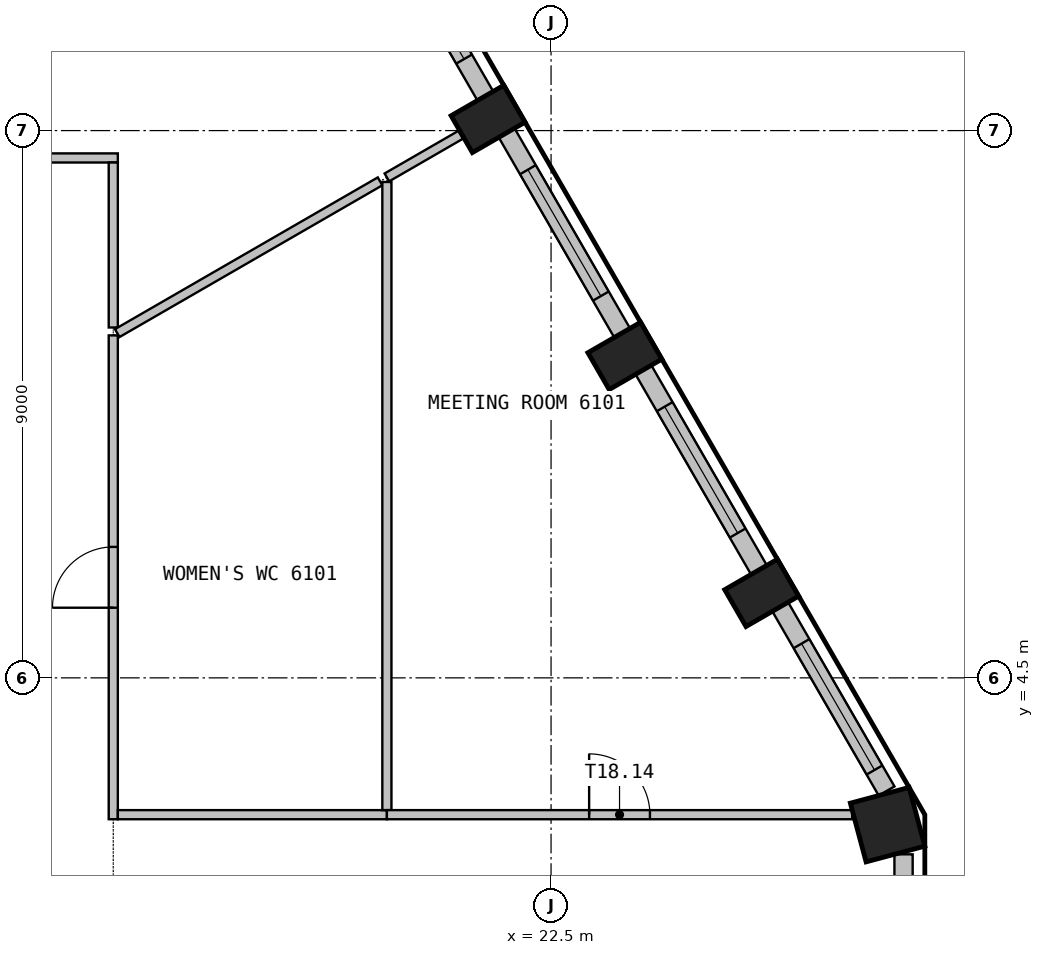
"""IFC4 building model, lengths in metres.
Left out: names, types, materials, properties, quantities, classifications, styles, units other than length and angle.
Written with IfcOpenShell. Run it as: python <this file> out.ifc"""

import sys

from ifc_helpers import new_model, si_unit, direction, frame, frame_2d, origin, origin_2d, place, context, subcontext, project, spatial, rectangle, extrude, element, fill, save


model = new_model("IFC4")
c1 = context("Model", 3, precision=1e-05, world=origin(), true_north=direction((0.0, 1.0)))
c2 = subcontext(c1, "Body", "Model", "MODEL_VIEW")
j1 = project(units=[si_unit("LENGTHUNIT", "METRE"), si_unit("PLANEANGLEUNIT", "RADIAN")], contexts=[c1])
p1 = place(None, origin())
s1 = spatial("IfcSite", under=j1, at=p1, CompositionType="ELEMENT")
p2 = place(p1, origin())
s2 = spatial("IfcBuilding", under=s1, at=p2, CompositionType="ELEMENT")
p3 = place(p2, frame((0.0, 0.0, 246.9)))
s3 = spatial("IfcBuildingStorey", under=s2, at=p3, CompositionType="ELEMENT", Elevation=246.9)
p4 = place(p3, frame((28.035, 2.086, 0.0), z_axis=(0.0, 0.0, 1.0), x_axis=(-0.258819045103, 0.965925826289, 0.0)))
e1 = element("IfcColumn", 1, at=p4, inside=s3, PredefinedType="COLUMN", context=c2, shape_type="SweptSolid", body=[
    extrude(rectangle(XDim=1.0, YDim=1.0, at=origin_2d()), origin(), (0.0, 0.0, 1.0), 3.575),
])
for number, where, z_axis, x_axis in (
    (2, (25.964, 5.897, 0.0), (0.0, 0.0, 1.0), (-0.5, 0.866, 0.0)),
    (3, (23.714, 9.794, 0.0), (0.0, 0.0, 1.0), (-0.5, 0.866, 0.0)),
    (4, (21.464, 13.691, 0.0), (0.0, 0.0, 1.0), (-0.5, 0.866, 0.0)),
):
    element("IfcColumn", number, at=place(p3, frame(where, z_axis=z_axis, x_axis=x_axis)), inside=s3, PredefinedType="COLUMN", context=c2, shape_type="SweptSolid", body=[
        extrude(rectangle(XDim=0.7, YDim=1.0, at=origin_2d()), origin(), (0.0, 0.0, 1.0), 3.575),
    ])
p5 = place(p3, frame((28.297, -1.598, 0.0), z_axis=(0.0, 0.0, 1.0), x_axis=(0.0, 1.0, 0.0)))
e5 = element("IfcWall", 5, at=p5, inside=s3, PredefinedType="SOLIDWALL", context=c2, shape_type="SweptSolid", body=[
    extrude(rectangle(XDim=3.196, YDim=0.3, at=frame_2d((1.598, 0.0))), origin(), (0.0, 0.0, 1.0), 3.575),
])
p6 = place(p5, frame((0.398, 0.0, 0.9)))
e6 = element("IfcOpeningElement", 6, at=p6, cuts=e5, PredefinedType="OPENING", context=c2, shape_type="SweptSolid", body=[
    extrude(rectangle(XDim=2.4, YDim=2.1, at=frame_2d((1.2, 1.05))), frame((0.0, 0.16, 0.0), z_axis=(0.0, -1.0, 0.0), x_axis=(1.0, 0.0, 0.0)), (0.0, 0.0, 1.0), 0.32),
])
p7 = place(p3, frame((28.018, 2.64, 0.0), z_axis=(0.0, 0.0, 1.0), x_axis=(-0.499990325971, 0.866030989016, 0.0)))
e7 = element("IfcWall", 7, at=p7, inside=s3, PredefinedType="SOLIDWALL", context=c2, shape_type="SweptSolid", body=[
    extrude(rectangle(XDim=3.498, YDim=0.3, at=frame_2d((1.749, 0.0))), origin(), (0.0, 0.0, 1.0), 3.575),
])
p8 = place(p7, frame((0.398, 0.0, 0.9)))
e8 = element("IfcOpeningElement", 8, at=p8, cuts=e7, PredefinedType="OPENING", context=c2, shape_type="SweptSolid", body=[
    extrude(rectangle(XDim=2.4, YDim=2.1, at=frame_2d((1.2, 1.05))), frame((0.0, 0.16, 0.0), z_axis=(0.0, -1.0, 0.0), x_axis=(1.0, 0.0, 0.0)), (0.0, 0.0, 1.0), 0.32),
])
p9 = place(p3, frame((25.919, 6.276, 0.0), z_axis=(0.0, 0.0, 1.0), x_axis=(-0.499982058975, 0.866035761792, 0.0)))
e9 = element("IfcWall", 9, at=p9, inside=s3, PredefinedType="SOLIDWALL", context=c2, shape_type="SweptSolid", body=[
    extrude(rectangle(XDim=3.799, YDim=0.3, at=frame_2d((1.899, 0.0))), origin(), (0.0, 0.0, 1.0), 3.575),
])
p10 = place(p9, frame((0.699, 0.0, 0.9)))
e10 = element("IfcOpeningElement", 10, at=p10, cuts=e9, PredefinedType="OPENING", context=c2, shape_type="SweptSolid", body=[
    extrude(rectangle(XDim=2.4, YDim=2.1, at=frame_2d((1.2, 1.05))), frame((0.0, 0.16, 0.0), z_axis=(0.0, -1.0, 0.0), x_axis=(1.0, 0.0, 0.0)), (0.0, 0.0, 1.0), 0.32),
])
p11 = place(p3, frame((23.669, 10.173, 0.0), z_axis=(0.0, 0.0, 1.0), x_axis=(-0.499982058975, 0.866035761792, 0.0)))
e11 = element("IfcWall", 11, at=p11, inside=s3, PredefinedType="SOLIDWALL", context=c2, shape_type="SweptSolid", body=[
    extrude(rectangle(XDim=3.799, YDim=0.3, at=frame_2d((1.899, 0.0))), origin(), (0.0, 0.0, 1.0), 3.575),
])
p12 = place(p11, frame((0.699, 0.0, 0.9)))
e12 = element("IfcOpeningElement", 12, at=p12, cuts=e11, PredefinedType="OPENING", context=c2, shape_type="SweptSolid", body=[
    extrude(rectangle(XDim=2.4, YDim=2.1, at=frame_2d((1.2, 1.05))), frame((0.0, 0.16, 0.0), z_axis=(0.0, -1.0, 0.0), x_axis=(1.0, 0.0, 0.0)), (0.0, 0.0, 1.0), 0.32),
])
p13 = place(p3, frame((21.419, 14.07, 0.0), z_axis=(0.0, 0.0, 1.0), x_axis=(-0.499960102815, 0.866048437209, 0.0)))
e13 = element("IfcWall", 13, at=p13, inside=s3, PredefinedType="SOLIDWALL", context=c2, shape_type="SweptSolid", body=[
    extrude(rectangle(XDim=3.498, YDim=0.3, at=frame_2d((1.749, 0.0))), origin(), (0.0, 0.0, 1.0), 3.575),
])
p14 = place(p13, frame((0.699, 0.0, 0.9)))
e14 = element("IfcOpeningElement", 14, at=p14, cuts=e13, PredefinedType="OPENING", context=c2, shape_type="SweptSolid", body=[
    extrude(rectangle(XDim=2.4, YDim=2.1, at=frame_2d((1.2, 1.05))), frame((0.0, 0.16, 0.0), z_axis=(0.0, -1.0, 0.0), x_axis=(1.0, 0.0, 0.0)), (0.0, 0.0, 1.0), 0.32),
])
p15 = place(p3, frame((15.375, 13.05, 0.0), z_axis=(0.0, 0.0, 1.0), x_axis=(-1.0, 0.0, 0.0)))
e15 = element("IfcWall", 15, at=p15, inside=s3, PredefinedType="PARTITIONING", context=c2, shape_type="SweptSolid", body=[
    extrude(rectangle(XDim=8.625, YDim=0.15, at=frame_2d((4.312, 0.0))), origin(), (0.0, 0.0, 1.0), 3.575),
])
p16 = place(p15, frame((3.812, 0.0, 0.0)))
e16 = element("IfcOpeningElement", 16, at=p16, cuts=e15, PredefinedType="OPENING", context=c2, shape_type="SweptSolid", body=[
    extrude(rectangle(XDim=1.0, YDim=2.1, at=frame_2d((0.5, 1.05))), frame((0.0, 0.085, 0.0), z_axis=(0.0, -1.0, 0.0), x_axis=(1.0, 0.0, 0.0)), (0.0, 0.0, 1.0), 0.17),
])
p17 = place(p3, frame((15.3, 2.175, 0.0), z_axis=(0.0, 0.0, 1.0), x_axis=(0.0, 1.0, 0.0)))
e17 = element("IfcWall", 17, at=p17, inside=s3, PredefinedType="PARTITIONING", context=c2, shape_type="SweptSolid", body=[
    extrude(rectangle(XDim=7.957, YDim=0.15, at=frame_2d((3.979, 0.0))), origin(), (0.0, 0.0, 1.0), 3.575),
])
p18 = place(p17, frame((3.479, 0.0, 0.0)))
e18 = element("IfcOpeningElement", 18, at=p18, cuts=e17, PredefinedType="OPENING", context=c2, shape_type="SweptSolid", body=[
    extrude(rectangle(XDim=1.0, YDim=2.1, at=frame_2d((0.5, 1.05))), frame((0.0, 0.085, 0.0), z_axis=(0.0, -1.0, 0.0), x_axis=(1.0, 0.0, 0.0)), (0.0, 0.0, 1.0), 0.17),
])
p19 = place(p3, frame((15.375, 2.25, 0.0), z_axis=(0.0, 0.0, 1.0), x_axis=(1.0, 0.0, 0.0)))
e19 = element("IfcWall", 19, at=p19, inside=s3, PredefinedType="PARTITIONING", context=c2, shape_type="SweptSolid", body=[
    extrude(rectangle(XDim=4.425, YDim=0.15, at=frame_2d((2.212, 0.0))), origin(), (0.0, 0.0, 1.0), 3.575),
])
p20 = place(p3, frame((15.3, 10.262, 0.0), z_axis=(0.0, 0.0, 1.0), x_axis=(0.0, 1.0, 0.0)))
e20 = element("IfcWall", 20, at=p20, inside=s3, PredefinedType="PARTITIONING", context=c2, shape_type="SweptSolid", body=[
    extrude(rectangle(XDim=2.713, YDim=0.15, at=frame_2d((1.356, 0.0))), origin(), (0.0, 0.0, 1.0), 3.575),
])
p21 = place(p3, frame((19.688, 12.665, 0.0), z_axis=(0.0, 0.0, 1.0), x_axis=(-0.866025118187, -0.500000494669, 0.0)))
e21 = element("IfcWall", 21, at=p21, inside=s3, PredefinedType="PARTITIONING", context=c2, shape_type="SweptSolid", body=[
    extrude(rectangle(XDim=4.991, YDim=0.15, at=frame_2d((2.496, 0.0))), origin(), (0.0, 0.0, 1.0), 3.575),
])
p22 = place(p3, frame((19.8, 12.655, 0.0), z_axis=(0.0, 0.0, 1.0), x_axis=(0.0, -1.0, 0.0)))
e22 = element("IfcWall", 22, at=p22, inside=s3, PredefinedType="PARTITIONING", context=c2, shape_type="SweptSolid", body=[
    extrude(rectangle(XDim=10.33, YDim=0.15, at=frame_2d((5.165, 0.0))), origin(), (0.0, 0.0, 1.0), 3.575),
])
p23 = place(p3, frame((19.8, 2.25, 0.0), z_axis=(0.0, 0.0, 1.0), x_axis=(1.0, 0.0, 0.0)))
e23 = element("IfcWall", 23, at=p23, inside=s3, PredefinedType="PARTITIONING", context=c2, shape_type="SweptSolid", body=[
    extrude(rectangle(XDim=7.652, YDim=0.15, at=frame_2d((3.826, 0.0))), origin(), (0.0, 0.0, 1.0), 3.575),
])
p24 = place(p23, frame((3.326, 0.0, 0.0)))
e24 = element("IfcOpeningElement", 24, at=p24, cuts=e23, PredefinedType="OPENING", context=c2, shape_type="SweptSolid", body=[
    extrude(rectangle(XDim=1.0, YDim=2.1, at=frame_2d((0.5, 1.05))), frame((0.0, 0.085, 0.0), z_axis=(0.0, -1.0, 0.0), x_axis=(1.0, 0.0, 0.0)), (0.0, 0.0, 1.0), 0.17),
])
p25 = place(p3, frame((21.014, 13.431, 0.0), z_axis=(0.0, 0.0, 1.0), x_axis=(-0.865918715181, -0.500184744569, 0.0)))
e25 = element("IfcWall", 25, at=p25, inside=s3, PredefinedType="PARTITIONING", context=c2, shape_type="SweptSolid", body=[
    extrude(rectangle(XDim=1.402, YDim=0.15, at=frame_2d((0.701, 0.0))), origin(), (0.0, 0.0, 1.0), 3.575),
])
p26 = place(p8, origin())
e26 = element("IfcWindow", 26, at=p26, inside=s3, PartitioningType="SINGLE_PANEL", PredefinedType="WINDOW", context=c2, shape_type="SweptSolid", body=[
    extrude(rectangle(XDim=2.4, YDim=2.1, at=frame_2d((1.2, 1.05))), frame((0.0, 0.03, 0.0), z_axis=(0.0, -1.0, 0.0), x_axis=(1.0, 0.0, 0.0)), (0.0, 0.0, 1.0), 0.06),
])
fill(e8, e26)
p27 = place(p10, origin())
e27 = element("IfcWindow", 27, at=p27, inside=s3, PartitioningType="SINGLE_PANEL", PredefinedType="WINDOW", context=c2, shape_type="SweptSolid", body=[
    extrude(rectangle(XDim=2.4, YDim=2.1, at=frame_2d((1.2, 1.05))), frame((0.0, 0.03, 0.0), z_axis=(0.0, -1.0, 0.0), x_axis=(1.0, 0.0, 0.0)), (0.0, 0.0, 1.0), 0.06),
])
fill(e10, e27)
p28 = place(p12, origin())
e28 = element("IfcWindow", 28, at=p28, inside=s3, PartitioningType="SINGLE_PANEL", PredefinedType="WINDOW", context=c2, shape_type="SweptSolid", body=[
    extrude(rectangle(XDim=2.4, YDim=2.1, at=frame_2d((1.2, 1.05))), frame((0.0, 0.03, 0.0), z_axis=(0.0, -1.0, 0.0), x_axis=(1.0, 0.0, 0.0)), (0.0, 0.0, 1.0), 0.06),
])
fill(e12, e28)
p29 = place(p14, origin())
e29 = element("IfcWindow", 29, at=p29, inside=s3, PartitioningType="SINGLE_PANEL", PredefinedType="WINDOW", context=c2, shape_type="SweptSolid", body=[
    extrude(rectangle(XDim=2.4, YDim=2.1, at=frame_2d((1.2, 1.05))), frame((0.0, 0.03, 0.0), z_axis=(0.0, -1.0, 0.0), x_axis=(1.0, 0.0, 0.0)), (0.0, 0.0, 1.0), 0.06),
])
fill(e14, e29)
p30 = place(p18, origin())
e30 = element("IfcDoor", 30, at=p30, inside=s3, OperationType="SINGLE_SWING_LEFT", PredefinedType="DOOR", context=c2, shape_type="SweptSolid", body=[
    extrude(rectangle(XDim=1.0, YDim=2.1, at=frame_2d((0.5, 1.05))), frame((0.0, 0.025, 0.0), z_axis=(0.0, -1.0, 0.0), x_axis=(1.0, 0.0, 0.0)), (0.0, 0.0, 1.0), 0.05),
])
fill(e18, e30)
p31 = place(p24, origin())
e31 = element("IfcDoor", 31, at=p31, inside=s3, OperationType="SINGLE_SWING_RIGHT", PredefinedType="DOOR", context=c2, shape_type="SweptSolid", body=[
    extrude(rectangle(XDim=1.0, YDim=2.1, at=frame_2d((0.5, 1.05))), frame((0.0, 0.025, 0.0), z_axis=(0.0, -1.0, 0.0), x_axis=(1.0, 0.0, 0.0)), (0.0, 0.0, 1.0), 0.05),
])
fill(e24, e31)
save(model, sys.argv[1])
